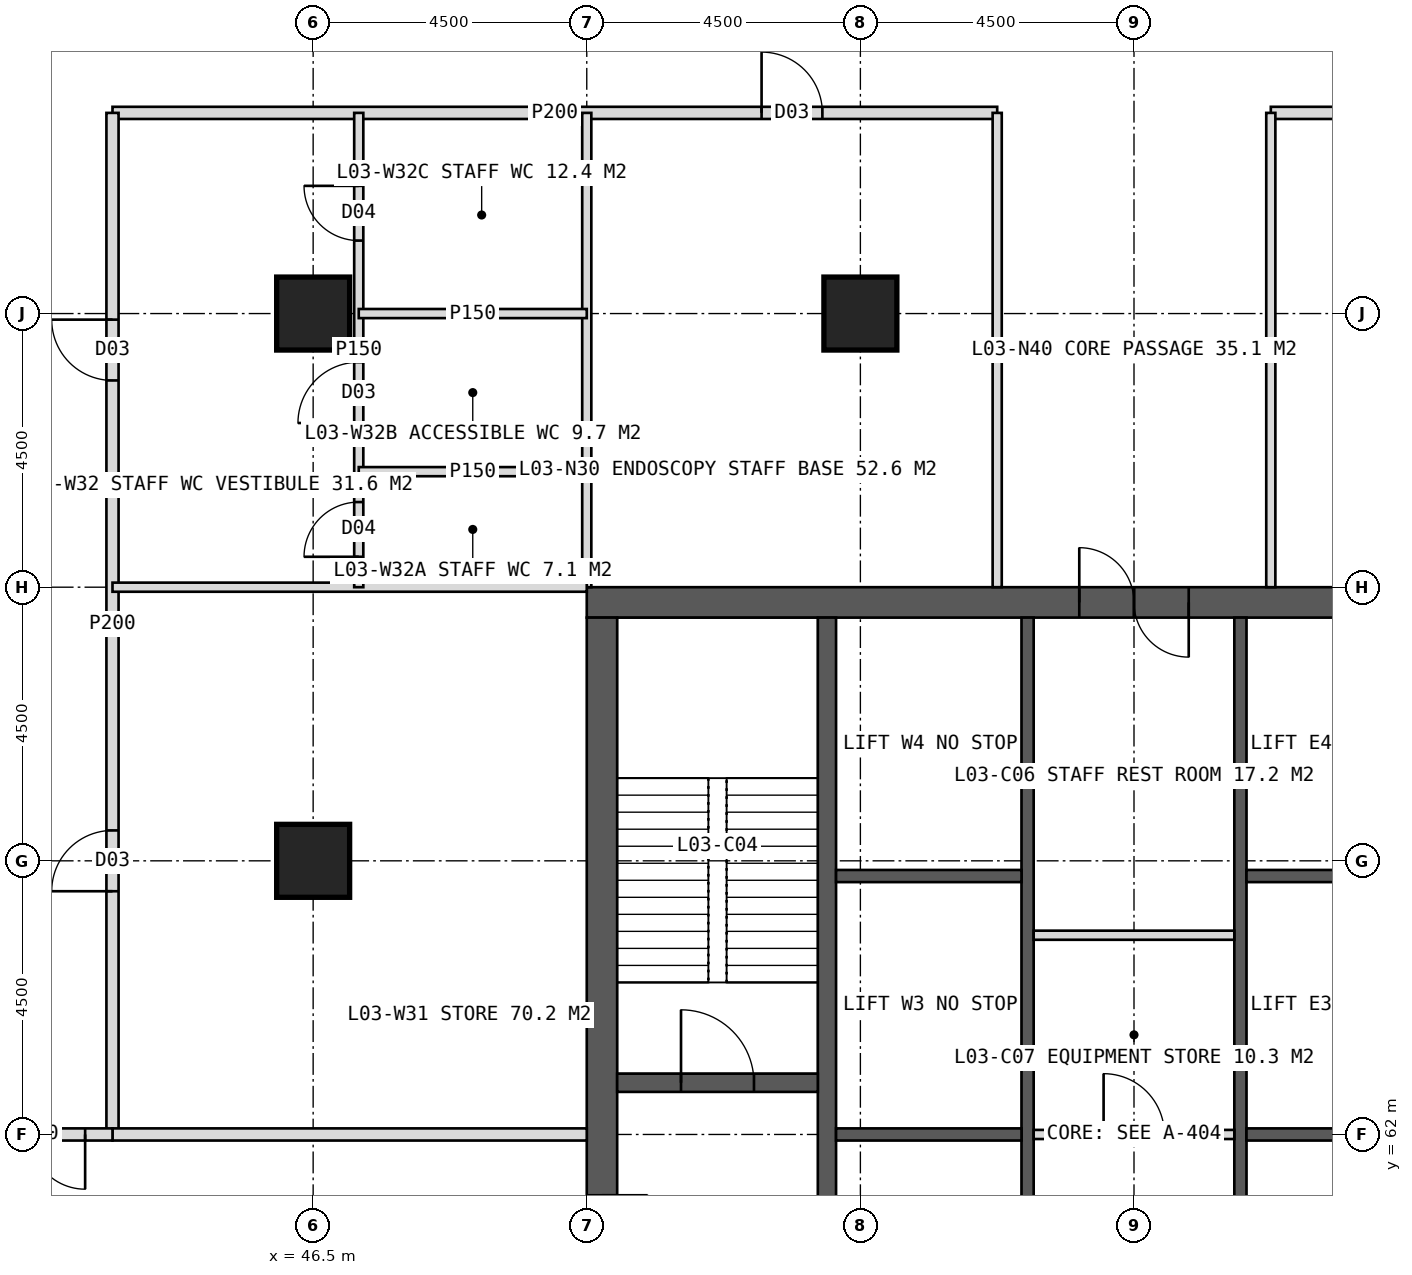
"""IFC4 building model, lengths in metres.
Left out: names, types, materials, properties, quantities, classifications, styles, units other than length and angle.
Written with IfcOpenShell. Run it as: python <this file> out.ifc"""

import sys

from ifc_helpers import new_model, si_unit, direction, frame, frame_2d, origin, origin_2d, place, context, subcontext, project, spatial, rectangle, hollow_rectangle, extrude, element, fill, save


model = new_model("IFC4")
c1 = context("Model", 3, precision=1e-05, world=origin(), true_north=direction((0.0, 1.0)))
c2 = subcontext(c1, "Body", "Model", "MODEL_VIEW")
j1 = project(units=[si_unit("LENGTHUNIT", "METRE"), si_unit("PLANEANGLEUNIT", "RADIAN")], contexts=[c1])
p1 = place(None, origin())
s1 = spatial("IfcSite", under=j1, at=p1, CompositionType="ELEMENT")
p2 = place(p1, origin())
s2 = spatial("IfcBuilding", under=s1, at=p2, CompositionType="ELEMENT")
p3 = place(p2, frame((0.0, 0.0, 16.5)))
s3 = spatial("IfcBuildingStorey", under=s2, at=p3, CompositionType="ELEMENT", Elevation=16.5)
p4 = place(p3, frame((51.0, 70.75, 0.0), z_axis=(0.0, 0.0, 1.0), x_axis=(1.0, 0.0, 0.0)))
e1 = element("IfcWall", 1, at=p4, inside=s3, PredefinedType="SHEAR", context=c2, shape_type="SweptSolid", body=[
    extrude(rectangle(XDim=18.0, YDim=0.5, at=frame_2d((9.0, 0.0))), origin(), (0.0, 0.0, 1.0), 4.5),
])
p5 = place(p4, frame((8.1, 0.0, 0.0)))
e2 = element("IfcOpeningElement", 2, at=p5, cuts=e1, PredefinedType="OPENING", context=c2, shape_type="SweptSolid", body=[
    extrude(rectangle(XDim=1.8, YDim=2.2, at=frame_2d((0.9, 1.1))), frame((0.0, 0.26, 0.0), z_axis=(0.0, -1.0, 0.0), x_axis=(1.0, 0.0, 0.0)), (0.0, 0.0, 1.0), 0.52),
])
p6 = place(p3, frame((51.25, 53.5, 0.0), z_axis=(0.0, 0.0, 1.0), x_axis=(0.0, 1.0, 0.0)))
e3 = element("IfcWall", 3, at=p6, inside=s3, PredefinedType="SHEAR", context=c2, shape_type="SweptSolid", body=[
    extrude(rectangle(XDim=17.0, YDim=0.5, at=frame_2d((8.5, 0.0))), origin(), (0.0, 0.0, 1.0), 4.5),
])
p7 = place(p6, frame((6.0, 0.0, 0.0)))
e4 = element("IfcOpeningElement", 4, at=p7, cuts=e3, PredefinedType="OPENING", context=c2, shape_type="SweptSolid", body=[
    extrude(rectangle(XDim=1.5, YDim=2.2, at=frame_2d((0.75, 1.1))), frame((0.0, 0.26, 0.0), z_axis=(0.0, -1.0, 0.0), x_axis=(1.0, 0.0, 0.0)), (0.0, 0.0, 1.0), 0.52),
])
p8 = place(p3, frame((54.95, 53.5, 0.0), z_axis=(0.0, 0.0, 1.0), x_axis=(0.0, 1.0, 0.0)))
e5 = element("IfcWall", 5, at=p8, inside=s3, PredefinedType="SHEAR", context=c2, shape_type="SweptSolid", body=[
    extrude(rectangle(XDim=17.0, YDim=0.3, at=frame_2d((8.5, 0.0))), origin(), (0.0, 0.0, 1.0), 4.5),
])
p9 = place(p3, frame((58.25, 53.5, 0.0), z_axis=(0.0, 0.0, 1.0), x_axis=(0.0, 1.0, 0.0)))
e6 = element("IfcWall", 6, at=p9, inside=s3, PredefinedType="SHEAR", context=c2, shape_type="SweptSolid", body=[
    extrude(rectangle(XDim=17.0, YDim=0.2, at=frame_2d((8.5, 0.0))), origin(), (0.0, 0.0, 1.0), 4.5),
])
p10 = place(p9, frame((1.375, 0.0, 0.0)))
e7 = element("IfcOpeningElement", 7, at=p10, cuts=e6, PredefinedType="OPENING", context=c2, shape_type="SweptSolid", body=[
    extrude(rectangle(XDim=1.4, YDim=2.2, at=frame_2d((0.7, 1.1))), frame((0.0, 0.11, 0.0), z_axis=(0.0, -1.0, 0.0), x_axis=(1.0, 0.0, 0.0)), (0.0, 0.0, 1.0), 0.22),
])
p11 = place(p9, frame((5.675, 0.0, 0.0)))
e8 = element("IfcOpeningElement", 8, at=p11, cuts=e6, PredefinedType="OPENING", context=c2, shape_type="SweptSolid", body=[
    extrude(rectangle(XDim=1.4, YDim=2.2, at=frame_2d((0.7, 1.1))), frame((0.0, 0.11, 0.0), z_axis=(0.0, -1.0, 0.0), x_axis=(1.0, 0.0, 0.0)), (0.0, 0.0, 1.0), 0.22),
])
p12 = place(p3, frame((61.75, 53.5, 0.0), z_axis=(0.0, 0.0, 1.0), x_axis=(0.0, 1.0, 0.0)))
e9 = element("IfcWall", 9, at=p12, inside=s3, PredefinedType="SHEAR", context=c2, shape_type="SweptSolid", body=[
    extrude(rectangle(XDim=17.0, YDim=0.2, at=frame_2d((8.5, 0.0))), origin(), (0.0, 0.0, 1.0), 4.5),
])
p13 = place(p12, frame((1.375, 0.0, 0.0)))
e10 = element("IfcOpeningElement", 10, at=p13, cuts=e9, PredefinedType="OPENING", context=c2, shape_type="SweptSolid", body=[
    extrude(rectangle(XDim=1.4, YDim=2.2, at=frame_2d((0.7, 1.1))), frame((0.0, 0.11, 0.0), z_axis=(0.0, -1.0, 0.0), x_axis=(1.0, 0.0, 0.0)), (0.0, 0.0, 1.0), 0.22),
])
p14 = place(p12, frame((5.675, 0.0, 0.0)))
e11 = element("IfcOpeningElement", 11, at=p14, cuts=e9, PredefinedType="OPENING", context=c2, shape_type="SweptSolid", body=[
    extrude(rectangle(XDim=1.4, YDim=2.2, at=frame_2d((0.7, 1.1))), frame((0.0, 0.11, 0.0), z_axis=(0.0, -1.0, 0.0), x_axis=(1.0, 0.0, 0.0)), (0.0, 0.0, 1.0), 0.22),
])
for number, where, z_axis, x_axis in (
    (12, (55.1, 62.0, 0.0), (0.0, 0.0, 1.0), (1.0, 0.0, 0.0)),
    (13, (61.85, 62.0, 0.0), (0.0, 0.0, 1.0), (1.0, 0.0, 0.0)),
    (14, (55.1, 66.25, 0.0), (0.0, 0.0, 1.0), (1.0, 0.0, 0.0)),
    (15, (61.85, 66.25, 0.0), (0.0, 0.0, 1.0), (1.0, 0.0, 0.0)),
):
    element("IfcWall", number, at=place(p3, frame(where, z_axis=z_axis, x_axis=x_axis)), inside=s3, PredefinedType="SHEAR", context=c2, shape_type="SweptSolid", body=[
        extrude(rectangle(XDim=3.05, YDim=0.2, at=frame_2d((1.525, 0.0))), origin(), (0.0, 0.0, 1.0), 4.5),
    ])
p15 = place(p3, frame((51.5, 62.85, 0.0), z_axis=(0.0, 0.0, 1.0), x_axis=(1.0, 0.0, 0.0)))
e16 = element("IfcWall", 16, at=p15, inside=s3, PredefinedType="SHEAR", context=c2, shape_type="SweptSolid", body=[
    extrude(rectangle(XDim=3.3, YDim=0.3, at=frame_2d((1.65, 0.0))), origin(), (0.0, 0.0, 1.0), 4.5),
])
p16 = place(p15, frame((1.05, 0.0, 0.0)))
e17 = element("IfcOpeningElement", 17, at=p16, cuts=e16, PredefinedType="OPENING", context=c2, shape_type="SweptSolid", body=[
    extrude(rectangle(XDim=1.2, YDim=2.1, at=frame_2d((0.6, 1.05))), frame((0.0, 0.16, 0.0), z_axis=(0.0, -1.0, 0.0), x_axis=(1.0, 0.0, 0.0)), (0.0, 0.0, 1.0), 0.32),
])
for number, where, z_axis, x_axis in (
    (18, (46.5, 75.5, 0.0), (0.0, 0.0, 1.0), (1.0, 0.0, 0.0)),
    (19, (55.5, 75.5, 0.0), (0.0, 0.0, 1.0), (1.0, 0.0, 0.0)),
    (20, (46.5, 66.5, 0.0), (0.0, 0.0, 1.0), (1.0, 0.0, 0.0)),
):
    element("IfcColumn", number, at=place(p3, frame(where, z_axis=z_axis, x_axis=x_axis)), inside=s3, PredefinedType="COLUMN", context=c2, shape_type="SweptSolid", body=[
        extrude(hollow_rectangle(XDim=1.2, YDim=1.2, WallThickness=0.1, at=origin_2d()), origin(), (0.0, 0.0, 1.0), 4.5),
    ])
p17 = place(p3, frame((43.2, 78.8, 0.0), z_axis=(0.0, 0.0, 1.0), x_axis=(1.0, 0.0, 0.0)))
e21 = element("IfcWall", 21, at=p17, inside=s3, PredefinedType="PARTITIONING", context=c2, shape_type="SweptSolid", body=[
    extrude(rectangle(XDim=14.55, YDim=0.2, at=frame_2d((7.275, 0.0))), origin(), (0.0, 0.0, 1.0), 4.2),
])
p18 = place(p17, frame((10.675, 0.0, 0.0)))
e22 = element("IfcOpeningElement", 22, at=p18, cuts=e21, PredefinedType="OPENING", context=c2, shape_type="SweptSolid", body=[
    extrude(rectangle(XDim=1.0, YDim=2.1, at=frame_2d((0.5, 1.05))), frame((0.0, 0.11, 0.0), z_axis=(0.0, -1.0, 0.0), x_axis=(1.0, 0.0, 0.0)), (0.0, 0.0, 1.0), 0.22),
])
p19 = place(p3, frame((62.25, 78.8, 0.0), z_axis=(0.0, 0.0, 1.0), x_axis=(1.0, 0.0, 0.0)))
e23 = element("IfcWall", 23, at=p19, inside=s3, PredefinedType="PARTITIONING", context=c2, shape_type="SweptSolid", body=[
    extrude(rectangle(XDim=6.75, YDim=0.2, at=frame_2d((3.375, 0.0))), origin(), (0.0, 0.0, 1.0), 4.2),
])
p20 = place(p19, frame((2.875, 0.0, 0.0)))
e24 = element("IfcOpeningElement", 24, at=p20, cuts=e23, PredefinedType="OPENING", context=c2, shape_type="SweptSolid", body=[
    extrude(rectangle(XDim=1.0, YDim=2.1, at=frame_2d((0.5, 1.05))), frame((0.0, 0.11, 0.0), z_axis=(0.0, -1.0, 0.0), x_axis=(1.0, 0.0, 0.0)), (0.0, 0.0, 1.0), 0.22),
])
for number, where, z_axis, x_axis in (
    (25, (51.0, 71.0, 0.0), (0.0, 0.0, 1.0), (0.0, 1.0, 0.0)),
    (26, (57.75, 71.0, 0.0), (0.0, 0.0, 1.0), (0.0, 1.0, 0.0)),
    (27, (62.25, 71.0, 0.0), (0.0, 0.0, 1.0), (0.0, 1.0, 0.0)),
):
    element("IfcWall", number, at=place(p3, frame(where, z_axis=z_axis, x_axis=x_axis)), inside=s3, PredefinedType="PARTITIONING", context=c2, shape_type="SweptSolid", body=[
        extrude(rectangle(XDim=7.8, YDim=0.15, at=frame_2d((3.9, 0.0))), origin(), (0.0, 0.0, 1.0), 4.2),
    ])
p21 = place(p3, frame((43.2, 62.0, 0.0), z_axis=(0.0, 0.0, 1.0), x_axis=(0.0, 1.0, 0.0)))
e28 = element("IfcWall", 28, at=p21, inside=s3, PredefinedType="PARTITIONING", context=c2, shape_type="SweptSolid", body=[
    extrude(rectangle(XDim=16.8, YDim=0.2, at=frame_2d((8.4, 0.0))), origin(), (0.0, 0.0, 1.0), 4.2),
])
p22 = place(p21, frame((4.0, 0.0, 0.0)))
e29 = element("IfcOpeningElement", 29, at=p22, cuts=e28, PredefinedType="OPENING", context=c2, shape_type="SweptSolid", body=[
    extrude(rectangle(XDim=1.0, YDim=2.1, at=frame_2d((0.5, 1.05))), frame((0.0, 0.11, 0.0), z_axis=(0.0, -1.0, 0.0), x_axis=(1.0, 0.0, 0.0)), (0.0, 0.0, 1.0), 0.22),
])
p23 = place(p21, frame((12.4, 0.0, 0.0)))
e30 = element("IfcOpeningElement", 30, at=p23, cuts=e28, PredefinedType="OPENING", context=c2, shape_type="SweptSolid", body=[
    extrude(rectangle(XDim=1.0, YDim=2.1, at=frame_2d((0.5, 1.05))), frame((0.0, 0.11, 0.0), z_axis=(0.0, -1.0, 0.0), x_axis=(1.0, 0.0, 0.0)), (0.0, 0.0, 1.0), 0.22),
])
p24 = place(p3, frame((51.0, 62.0, 0.0), z_axis=(0.0, 0.0, 1.0), x_axis=(-1.0, 0.0, 0.0)))
e31 = element("IfcWall", 31, at=p24, inside=s3, PredefinedType="SOLIDWALL", context=c2, shape_type="SweptSolid", body=[
    extrude(rectangle(XDim=7.8, YDim=0.2, at=frame_2d((3.9, 0.0))), origin(), (0.0, 0.0, 1.0), 3.4),
])
p25 = place(p3, frame((51.0, 71.0, 0.0), z_axis=(0.0, 0.0, 1.0), x_axis=(-1.0, 0.0, 0.0)))
e32 = element("IfcWall", 32, at=p25, inside=s3, PredefinedType="PARTITIONING", context=c2, shape_type="SweptSolid", body=[
    extrude(rectangle(XDim=7.8, YDim=0.15, at=frame_2d((3.9, 0.0))), origin(), (0.0, 0.0, 1.0), 4.2),
])
p26 = place(p3, frame((47.25, 71.0, 0.0), z_axis=(0.0, 0.0, 1.0), x_axis=(0.0, 1.0, 0.0)))
e33 = element("IfcWall", 33, at=p26, inside=s3, PredefinedType="PARTITIONING", context=c2, shape_type="SweptSolid", body=[
    extrude(rectangle(XDim=7.8, YDim=0.15, at=frame_2d((3.9, 0.0))), origin(), (0.0, 0.0, 1.0), 4.2),
])
p27 = place(p26, frame((0.5, 0.0, 0.0)))
e34 = element("IfcOpeningElement", 34, at=p27, cuts=e33, PredefinedType="OPENING", context=c2, shape_type="SweptSolid", body=[
    extrude(rectangle(XDim=0.9, YDim=2.1, at=frame_2d((0.45, 1.05))), frame((0.0, 0.085, 0.0), z_axis=(0.0, -1.0, 0.0), x_axis=(1.0, 0.0, 0.0)), (0.0, 0.0, 1.0), 0.17),
])
p28 = place(p26, frame((2.7, 0.0, 0.0)))
e35 = element("IfcOpeningElement", 35, at=p28, cuts=e33, PredefinedType="OPENING", context=c2, shape_type="SweptSolid", body=[
    extrude(rectangle(XDim=1.0, YDim=2.1, at=frame_2d((0.5, 1.05))), frame((0.0, 0.085, 0.0), z_axis=(0.0, -1.0, 0.0), x_axis=(1.0, 0.0, 0.0)), (0.0, 0.0, 1.0), 0.17),
])
p29 = place(p26, frame((5.7, 0.0, 0.0)))
e36 = element("IfcOpeningElement", 36, at=p29, cuts=e33, PredefinedType="OPENING", context=c2, shape_type="SweptSolid", body=[
    extrude(rectangle(XDim=0.9, YDim=2.1, at=frame_2d((0.45, 1.05))), frame((0.0, 0.085, 0.0), z_axis=(0.0, -1.0, 0.0), x_axis=(1.0, 0.0, 0.0)), (0.0, 0.0, 1.0), 0.17),
])
p30 = place(p3, frame((51.0, 72.9, 0.0), z_axis=(0.0, 0.0, 1.0), x_axis=(-1.0, 0.0, 0.0)))
e37 = element("IfcWall", 37, at=p30, inside=s3, PredefinedType="PARTITIONING", context=c2, shape_type="SweptSolid", body=[
    extrude(rectangle(XDim=3.75, YDim=0.15, at=frame_2d((1.875, 0.0))), origin(), (0.0, 0.0, 1.0), 4.2),
])
p31 = place(p3, frame((51.0, 75.5, 0.0), z_axis=(0.0, 0.0, 1.0), x_axis=(-1.0, 0.0, 0.0)))
e38 = element("IfcWall", 38, at=p31, inside=s3, PredefinedType="PARTITIONING", context=c2, shape_type="SweptSolid", body=[
    extrude(rectangle(XDim=3.75, YDim=0.15, at=frame_2d((1.875, 0.0))), origin(), (0.0, 0.0, 1.0), 3.4),
])
p32 = place(p3, frame((43.2, 62.0, 0.0), z_axis=(0.0, 0.0, 1.0), x_axis=(-1.0, 0.0, 0.0)))
e39 = element("IfcWall", 39, at=p32, inside=s3, PredefinedType="SOLIDWALL", context=c2, shape_type="SweptSolid", body=[
    extrude(rectangle(XDim=2.7, YDim=0.2, at=frame_2d((1.35, 0.0))), origin(), (0.0, 0.0, 1.0), 3.4),
])
p33 = place(p32, frame((0.45, 0.0, 0.0)))
e40 = element("IfcOpeningElement", 40, at=p33, cuts=e39, PredefinedType="OPENING", context=c2, shape_type="SweptSolid", body=[
    extrude(rectangle(XDim=1.8, YDim=2.2, at=frame_2d((0.9, 1.1))), frame((0.0, 0.11, 0.0), z_axis=(0.0, -1.0, 0.0), x_axis=(1.0, 0.0, 0.0)), (0.0, 0.0, 1.0), 0.22),
])
p34 = place(p3, frame((58.35, 62.0, 0.0), z_axis=(0.0, 0.0, 1.0), x_axis=(1.0, 0.0, 0.0)))
e41 = element("IfcWall", 41, at=p34, inside=s3, PredefinedType="PARTITIONING", context=c2, shape_type="SweptSolid", body=[
    extrude(rectangle(XDim=3.3, YDim=0.15, at=frame_2d((1.65, 0.0))), origin(), (0.0, 0.0, 1.0), 4.2),
])
p35 = place(p34, frame((1.15, 0.0, 0.0)))
e42 = element("IfcOpeningElement", 42, at=p35, cuts=e41, PredefinedType="OPENING", context=c2, shape_type="SweptSolid", body=[
    extrude(rectangle(XDim=1.0, YDim=2.1, at=frame_2d((0.5, 1.05))), frame((0.0, 0.085, 0.0), z_axis=(0.0, -1.0, 0.0), x_axis=(1.0, 0.0, 0.0)), (0.0, 0.0, 1.0), 0.17),
])
p36 = place(p3, frame((58.35, 65.277, 0.0), z_axis=(0.0, 0.0, 1.0), x_axis=(1.0, 0.0, 0.0)))
e43 = element("IfcWall", 43, at=p36, inside=s3, PredefinedType="PARTITIONING", context=c2, shape_type="SweptSolid", body=[
    extrude(rectangle(XDim=3.3, YDim=0.15, at=frame_2d((1.65, 0.0))), origin(), (0.0, 0.0, 1.0), 4.2),
])
p37 = place(p18, origin())
e44 = element("IfcDoor", 44, at=p37, inside=s3, OperationType="SINGLE_SWING_LEFT", PredefinedType="DOOR", context=c2, shape_type="SweptSolid", body=[
    extrude(rectangle(XDim=1.0, YDim=2.1, at=frame_2d((0.5, 1.05))), frame((0.0, 0.025, 0.0), z_axis=(0.0, -1.0, 0.0), x_axis=(1.0, 0.0, 0.0)), (0.0, 0.0, 1.0), 0.05),
])
fill(e22, e44)
p38 = place(p22, origin())
e45 = element("IfcDoor", 45, at=p38, inside=s3, OperationType="SINGLE_SWING_LEFT", PredefinedType="DOOR", context=c2, shape_type="SweptSolid", body=[
    extrude(rectangle(XDim=1.0, YDim=2.1, at=frame_2d((0.5, 1.05))), frame((0.0, 0.025, 0.0), z_axis=(0.0, -1.0, 0.0), x_axis=(1.0, 0.0, 0.0)), (0.0, 0.0, 1.0), 0.05),
])
fill(e29, e45)
p39 = place(p23, origin())
e46 = element("IfcDoor", 46, at=p39, inside=s3, OperationType="SINGLE_SWING_RIGHT", PredefinedType="DOOR", context=c2, shape_type="SweptSolid", body=[
    extrude(rectangle(XDim=1.0, YDim=2.1, at=frame_2d((0.5, 1.05))), frame((0.0, 0.025, 0.0), z_axis=(0.0, -1.0, 0.0), x_axis=(1.0, 0.0, 0.0)), (0.0, 0.0, 1.0), 0.05),
])
fill(e30, e46)
p40 = place(p33, origin())
e47 = element("IfcDoor", 47, at=p40, inside=s3, OperationType="DOUBLE_DOOR_DOUBLE_SWING", PredefinedType="DOOR", context=c2, shape_type="SweptSolid", body=[
    extrude(rectangle(XDim=1.8, YDim=2.2, at=frame_2d((0.9, 1.1))), frame((0.0, 0.025, 0.0), z_axis=(0.0, -1.0, 0.0), x_axis=(1.0, 0.0, 0.0)), (0.0, 0.0, 1.0), 0.05),
])
fill(e40, e47)
p41 = place(p16, origin())
e48 = element("IfcDoor", 48, at=p41, inside=s3, OperationType="SINGLE_SWING_LEFT", PredefinedType="DOOR", context=c2, shape_type="SweptSolid", body=[
    extrude(rectangle(XDim=1.2, YDim=2.1, at=frame_2d((0.6, 1.05))), frame((0.0, 0.025, 0.0), z_axis=(0.0, -1.0, 0.0), x_axis=(1.0, 0.0, 0.0)), (0.0, 0.0, 1.0), 0.05),
])
fill(e17, e48)
p42 = place(p35, origin())
e49 = element("IfcDoor", 49, at=p42, inside=s3, OperationType="SINGLE_SWING_LEFT", PredefinedType="DOOR", context=c2, shape_type="SweptSolid", body=[
    extrude(rectangle(XDim=1.0, YDim=2.1, at=frame_2d((0.5, 1.05))), frame((0.0, 0.025, 0.0), z_axis=(0.0, -1.0, 0.0), x_axis=(1.0, 0.0, 0.0)), (0.0, 0.0, 1.0), 0.05),
])
fill(e42, e49)
p43 = place(p5, origin())
e50 = element("IfcDoor", 50, at=p43, inside=s3, OperationType="DOUBLE_DOOR_SINGLE_SWING", PredefinedType="DOOR", context=c2, shape_type="SweptSolid", body=[
    extrude(rectangle(XDim=1.8, YDim=2.2, at=frame_2d((0.9, 1.1))), frame((0.0, 0.025, 0.0), z_axis=(0.0, -1.0, 0.0), x_axis=(1.0, 0.0, 0.0)), (0.0, 0.0, 1.0), 0.05),
])
fill(e2, e50)
p44 = place(p27, origin())
e51 = element("IfcDoor", 51, at=p44, inside=s3, OperationType="SINGLE_SWING_LEFT", PredefinedType="DOOR", context=c2, shape_type="SweptSolid", body=[
    extrude(rectangle(XDim=0.9, YDim=2.1, at=frame_2d((0.45, 1.05))), frame((0.0, 0.025, 0.0), z_axis=(0.0, -1.0, 0.0), x_axis=(1.0, 0.0, 0.0)), (0.0, 0.0, 1.0), 0.05),
])
fill(e34, e51)
p45 = place(p28, origin())
e52 = element("IfcDoor", 52, at=p45, inside=s3, OperationType="SINGLE_SWING_LEFT", PredefinedType="DOOR", context=c2, shape_type="SweptSolid", body=[
    extrude(rectangle(XDim=1.0, YDim=2.1, at=frame_2d((0.5, 1.05))), frame((0.0, 0.025, 0.0), z_axis=(0.0, -1.0, 0.0), x_axis=(1.0, 0.0, 0.0)), (0.0, 0.0, 1.0), 0.05),
])
fill(e35, e52)
p46 = place(p29, origin())
e53 = element("IfcDoor", 53, at=p46, inside=s3, OperationType="SINGLE_SWING_RIGHT", PredefinedType="DOOR", context=c2, shape_type="SweptSolid", body=[
    extrude(rectangle(XDim=0.9, YDim=2.1, at=frame_2d((0.45, 1.05))), frame((0.0, 0.025, 0.0), z_axis=(0.0, -1.0, 0.0), x_axis=(1.0, 0.0, 0.0)), (0.0, 0.0, 1.0), 0.05),
])
fill(e36, e53)
save(model, sys.argv[1])
